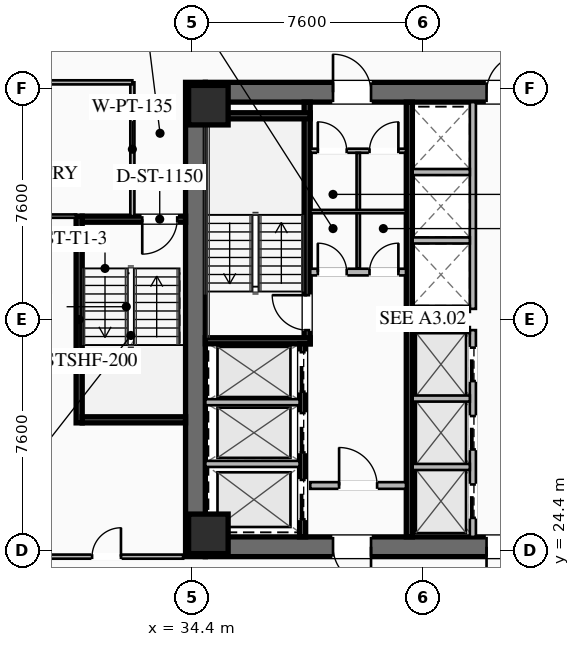
"""IFC4 building model, lengths in metres.
Left out: names, types, materials, properties, quantities, classifications, styles, units other than length and angle.
Written with IfcOpenShell. Run it as: python <this file> out.ifc"""

import sys

from ifc_helpers import new_model, si_unit, direction, frame, frame_2d, origin, origin_2d, place, context, subcontext, project, spatial, rectangle, hollow_rectangle, extrude, element, fill, save


model = new_model("IFC4")
c1 = context("Model", 3, precision=1e-05, world=origin(), true_north=direction((0.0, 1.0)))
c2 = subcontext(c1, "Body", "Model", "MODEL_VIEW")
j1 = project(units=[si_unit("LENGTHUNIT", "METRE"), si_unit("PLANEANGLEUNIT", "RADIAN")], contexts=[c1])
p1 = place(None, origin())
s1 = spatial("IfcSite", under=j1, at=p1, CompositionType="ELEMENT")
p2 = place(p1, origin())
s2 = spatial("IfcBuilding", under=s1, at=p2, CompositionType="ELEMENT")
p3 = place(p2, frame((0.0, 0.0, 88.5)))
s3 = spatial("IfcBuildingStorey", under=s2, at=p3, CompositionType="ELEMENT", Elevation=88.5)
p4 = place(p3, frame((34.525, 24.2, 0.0), z_axis=(0.0, 0.0, 1.0), x_axis=(0.0, 1.0, 0.0)))
e1 = element("IfcWall", 1, at=p4, inside=s3, PredefinedType="SHEAR", context=c2, shape_type="SweptSolid", body=[
    extrude(rectangle(XDim=15.6, YDim=0.65, at=frame_2d((7.8, 0.0))), origin(), (0.0, 0.0, 1.0), 3.55),
])
p5 = place(p3, frame((49.15, 24.525, 0.0), z_axis=(0.0, 0.0, 1.0), x_axis=(-1.0, 0.0, 0.0)))
e2 = element("IfcWall", 2, at=p5, inside=s3, PredefinedType="SHEAR", context=c2, shape_type="SweptSolid", body=[
    extrude(rectangle(XDim=14.3, YDim=0.65, at=frame_2d((7.15, 0.0))), origin(), (0.0, 0.0, 1.0), 3.55),
])
p6 = place(p5, frame((8.85, 0.0, 0.0)))
e3 = element("IfcOpeningElement", 3, at=p6, cuts=e2, PredefinedType="OPENING", context=c2, shape_type="SweptSolid", body=[
    extrude(rectangle(XDim=1.25, YDim=2.25, at=frame_2d((0.625, 1.125))), frame((0.0, 0.335, 0.0), z_axis=(0.0, -1.0, 0.0), x_axis=(1.0, 0.0, 0.0)), (0.0, 0.0, 1.0), 0.67),
])
p7 = place(p5, frame((3.8, 0.0, 0.0)))
e4 = element("IfcOpeningElement", 4, at=p7, cuts=e2, PredefinedType="OPENING", context=c2, shape_type="SweptSolid", body=[
    extrude(rectangle(XDim=1.25, YDim=2.25, at=frame_2d((0.625, 1.125))), frame((0.0, 0.335, 0.0), z_axis=(0.0, -1.0, 0.0), x_axis=(1.0, 0.0, 0.0)), (0.0, 0.0, 1.0), 0.67),
])
p8 = place(p3, frame((34.85, 39.475, 0.0), z_axis=(0.0, 0.0, 1.0), x_axis=(1.0, 0.0, 0.0)))
e5 = element("IfcWall", 5, at=p8, inside=s3, PredefinedType="SHEAR", context=c2, shape_type="SweptSolid", body=[
    extrude(rectangle(XDim=14.3, YDim=0.65, at=frame_2d((7.15, 0.0))), origin(), (0.0, 0.0, 1.0), 3.55),
])
p9 = place(p8, frame((4.2, 0.0, 0.0)))
e6 = element("IfcOpeningElement", 6, at=p9, cuts=e5, PredefinedType="OPENING", context=c2, shape_type="SweptSolid", body=[
    extrude(rectangle(XDim=1.25, YDim=2.25, at=frame_2d((0.625, 1.125))), frame((0.0, 0.335, 0.0), z_axis=(0.0, -1.0, 0.0), x_axis=(1.0, 0.0, 0.0)), (0.0, 0.0, 1.0), 0.67),
])
p10 = place(p8, frame((9.25, 0.0, 0.0)))
e7 = element("IfcOpeningElement", 7, at=p10, cuts=e5, PredefinedType="OPENING", context=c2, shape_type="SweptSolid", body=[
    extrude(rectangle(XDim=1.25, YDim=2.25, at=frame_2d((0.625, 1.125))), frame((0.0, 0.335, 0.0), z_axis=(0.0, -1.0, 0.0), x_axis=(1.0, 0.0, 0.0)), (0.0, 0.0, 1.0), 0.67),
])
for number, where, z_axis, x_axis in (
    (8, (34.95, 24.95, 0.0), (0.0, 0.0, 1.0), (1.0, 0.0, 0.0)),
    (9, (34.95, 39.05, 0.0), (0.0, 0.0, 1.0), (1.0, 0.0, 0.0)),
):
    element("IfcColumn", number, at=place(p3, frame(where, z_axis=z_axis, x_axis=x_axis)), inside=s3, PredefinedType="COLUMN", context=c2, shape_type="SweptSolid", body=[
        extrude(hollow_rectangle(XDim=1.3, YDim=1.3, WallThickness=0.05, at=origin_2d()), origin(), (0.0, 0.0, 1.0), 3.35),
    ])
p11 = place(p3, frame((38.2, 31.2, 0.0), z_axis=(0.0, 0.0, 1.0), x_axis=(0.0, 1.0, 0.0)))
e10 = element("IfcWall", 10, at=p11, inside=s3, PredefinedType="SHEAR", context=c2, shape_type="SweptSolid", body=[
    extrude(rectangle(XDim=7.95, YDim=0.2, at=frame_2d((3.975, 0.0))), origin(), (0.0, 0.0, 1.0), 3.35),
])
p12 = place(p11, frame((0.45, 0.0, 0.0)))
e11 = element("IfcOpeningElement", 11, at=p12, cuts=e10, PredefinedType="OPENING", context=c2, shape_type="SweptSolid", body=[
    extrude(rectangle(XDim=1.15, YDim=2.2, at=frame_2d((0.575, 1.1))), frame((0.0, 0.11, 0.0), z_axis=(0.0, -1.0, 0.0), x_axis=(1.0, 0.0, 0.0)), (0.0, 0.0, 1.0), 0.22),
])
for number, where, z_axis, x_axis in (
    (12, (34.85, 31.3, 0.0), (0.0, 0.0, 1.0), (1.0, 0.0, 0.0)),
    (13, (34.85, 38.7, 0.0), (0.0, 0.0, 1.0), (1.0, 0.0, 0.0)),
):
    element("IfcWall", number, at=place(p3, frame(where, z_axis=z_axis, x_axis=x_axis)), inside=s3, PredefinedType="SHEAR", context=c2, shape_type="SweptSolid", body=[
        extrude(rectangle(XDim=3.45, YDim=0.2, at=frame_2d((1.725, 0.0))), origin(), (0.0, 0.0, 1.0), 3.35),
    ])
p13 = place(p3, frame((41.56, 24.85, 0.0), z_axis=(0.0, 0.0, 1.0), x_axis=(0.0, 1.0, 0.0)))
e14 = element("IfcWall", 14, at=p13, inside=s3, PredefinedType="SHEAR", context=c2, shape_type="SweptSolid", body=[
    extrude(rectangle(XDim=14.3, YDim=0.2, at=frame_2d((7.15, 0.0))), origin(), (0.0, 0.0, 1.0), 3.35),
])
p14 = place(p3, frame((38.3, 33.56, 0.0), z_axis=(0.0, 0.0, 1.0), x_axis=(1.0, 0.0, 0.0)))
e15 = element("IfcWall", 15, at=p14, inside=s3, PredefinedType="SOLIDWALL", context=c2, shape_type="SweptSolid", body=[
    extrude(rectangle(XDim=3.15, YDim=0.22, at=frame_2d((1.575, 0.0))), origin(), (0.0, 0.0, 1.0), 2.703),
])
p15 = place(p14, frame((0.25, 0.0, 0.0)))
e16 = element("IfcOpeningElement", 16, at=p15, cuts=e15, PredefinedType="OPENING", context=c2, shape_type="SweptSolid", body=[
    extrude(rectangle(XDim=0.95, YDim=2.05, at=frame_2d((0.475, 1.025))), frame((0.0, 0.12, 0.0), z_axis=(0.0, -1.0, 0.0), x_axis=(1.0, 0.0, 0.0)), (0.0, 0.0, 1.0), 0.24),
])
p16 = place(p14, frame((1.95, 0.0, 0.0)))
e17 = element("IfcOpeningElement", 17, at=p16, cuts=e15, PredefinedType="OPENING", context=c2, shape_type="SweptSolid", body=[
    extrude(rectangle(XDim=0.95, YDim=2.05, at=frame_2d((0.475, 1.025))), frame((0.0, 0.12, 0.0), z_axis=(0.0, -1.0, 0.0), x_axis=(1.0, 0.0, 0.0)), (0.0, 0.0, 1.0), 0.24),
])
p17 = place(p3, frame((38.3, 26.54, 0.0), z_axis=(0.0, 0.0, 1.0), x_axis=(1.0, 0.0, 0.0)))
e18 = element("IfcWall", 18, at=p17, inside=s3, PredefinedType="SOLIDWALL", context=c2, shape_type="SweptSolid", body=[
    extrude(rectangle(XDim=3.15, YDim=0.22, at=frame_2d((1.575, 0.0))), origin(), (0.0, 0.0, 1.0), 2.703),
])
p18 = place(p17, frame((0.95, 0.0, 0.0)))
e19 = element("IfcOpeningElement", 19, at=p18, cuts=e18, PredefinedType="OPENING", context=c2, shape_type="SweptSolid", body=[
    extrude(rectangle(XDim=1.25, YDim=2.25, at=frame_2d((0.625, 1.125))), frame((0.0, 0.12, 0.0), z_axis=(0.0, -1.0, 0.0), x_axis=(1.0, 0.0, 0.0)), (0.0, 0.0, 1.0), 0.24),
])
p19 = place(p3, frame((38.05, 24.85, 0.0), z_axis=(0.0, 0.0, 1.0), x_axis=(0.0, 1.0, 0.0)))
e20 = element("IfcWall", 20, at=p19, inside=s3, PredefinedType="SHEAR", context=c2, shape_type="SweptSolid", body=[
    extrude(rectangle(XDim=6.35, YDim=0.2, at=frame_2d((3.175, 0.0))), origin(), (0.0, 0.0, 1.0), 3.35),
])
p20 = place(p19, frame((4.775, 0.0, 0.0)))
e21 = element("IfcOpeningElement", 21, at=p20, cuts=e20, PredefinedType="OPENING", context=c2, shape_type="SweptSolid", body=[
    extrude(rectangle(XDim=1.3, YDim=2.25, at=frame_2d((0.65, 1.125))), frame((0.0, 0.11, 0.0), z_axis=(0.0, -1.0, 0.0), x_axis=(1.0, 0.0, 0.0)), (0.0, 0.0, 1.0), 0.22),
])
p21 = place(p19, frame((2.775, 0.0, 0.0)))
e22 = element("IfcOpeningElement", 22, at=p21, cuts=e20, PredefinedType="OPENING", context=c2, shape_type="SweptSolid", body=[
    extrude(rectangle(XDim=1.3, YDim=2.25, at=frame_2d((0.65, 1.125))), frame((0.0, 0.11, 0.0), z_axis=(0.0, -1.0, 0.0), x_axis=(1.0, 0.0, 0.0)), (0.0, 0.0, 1.0), 0.22),
])
p22 = place(p19, frame((0.575, 0.0, 0.0)))
e23 = element("IfcOpeningElement", 23, at=p22, cuts=e20, PredefinedType="OPENING", context=c2, shape_type="SweptSolid", body=[
    extrude(rectangle(XDim=1.3, YDim=2.25, at=frame_2d((0.65, 1.125))), frame((0.0, 0.11, 0.0), z_axis=(0.0, -1.0, 0.0), x_axis=(1.0, 0.0, 0.0)), (0.0, 0.0, 1.0), 0.22),
])
for number, where, z_axis, x_axis in (
    (24, (34.85, 27.25, 0.0), (0.0, 0.0, 1.0), (1.0, 0.0, 0.0)),
    (25, (34.85, 29.28, 0.0), (0.0, 0.0, 1.0), (1.0, 0.0, 0.0)),
):
    element("IfcWall", number, at=place(p3, frame(where, z_axis=z_axis, x_axis=x_axis)), inside=s3, PredefinedType="SOLIDWALL", context=c2, shape_type="SweptSolid", body=[
        extrude(rectangle(XDim=3.1, YDim=0.2, at=frame_2d((1.55, 0.0))), origin(), (0.0, 0.0, 1.0), 3.35),
    ])
p23 = place(p3, frame((38.3, 37.55, 0.0), z_axis=(0.0, 0.0, 1.0), x_axis=(1.0, 0.0, 0.0)))
e26 = element("IfcWall", 26, at=p23, inside=s3, PredefinedType="PARTITIONING", context=c2, shape_type="SweptSolid", body=[
    extrude(rectangle(XDim=3.15, YDim=0.135, at=frame_2d((1.575, 0.0))), origin(), (0.0, 0.0, 1.0), 2.703),
])
p24 = place(p23, frame((0.25, 0.0, 0.0)))
e27 = element("IfcOpeningElement", 27, at=p24, cuts=e26, PredefinedType="OPENING", context=c2, shape_type="SweptSolid", body=[
    extrude(rectangle(XDim=0.95, YDim=2.05, at=frame_2d((0.475, 1.025))), frame((0.0, 0.077, 0.0), z_axis=(0.0, -1.0, 0.0), x_axis=(1.0, 0.0, 0.0)), (0.0, 0.0, 1.0), 0.155),
])
p25 = place(p23, frame((1.95, 0.0, 0.0)))
e28 = element("IfcOpeningElement", 28, at=p25, cuts=e26, PredefinedType="OPENING", context=c2, shape_type="SweptSolid", body=[
    extrude(rectangle(XDim=0.95, YDim=2.05, at=frame_2d((0.475, 1.025))), frame((0.0, 0.077, 0.0), z_axis=(0.0, -1.0, 0.0), x_axis=(1.0, 0.0, 0.0)), (0.0, 0.0, 1.0), 0.155),
])
p26 = place(p3, frame((39.88, 33.68, 0.0), z_axis=(0.0, 0.0, 1.0), x_axis=(0.0, 1.0, 0.0)))
e29 = element("IfcWall", 29, at=p26, inside=s3, PredefinedType="PARTITIONING", context=c2, shape_type="SweptSolid", body=[
    extrude(rectangle(XDim=3.8, YDim=0.11, at=frame_2d((1.9, 0.0))), origin(), (0.0, 0.0, 1.0), 2.703),
])
p27 = place(p3, frame((38.3, 35.55, 0.0), z_axis=(0.0, 0.0, 1.0), x_axis=(1.0, 0.0, 0.0)))
e30 = element("IfcWall", 30, at=p27, inside=s3, PredefinedType="PARTITIONING", context=c2, shape_type="SweptSolid", body=[
    extrude(rectangle(XDim=3.15, YDim=0.11, at=frame_2d((1.575, 0.0))), origin(), (0.0, 0.0, 1.0), 2.703),
])
p28 = place(p3, frame((43.65, 24.85, 0.0), z_axis=(0.0, 0.0, 1.0), x_axis=(0.0, 1.0, 0.0)))
e31 = element("IfcWall", 31, at=p28, inside=s3, PredefinedType="SOLIDWALL", context=c2, shape_type="SweptSolid", body=[
    extrude(rectangle(XDim=6.8, YDim=0.2, at=frame_2d((3.4, 0.0))), origin(), (0.0, 0.0, 1.0), 3.35),
])
p29 = place(p28, frame((0.625, 0.0, 0.0)))
e32 = element("IfcOpeningElement", 32, at=p29, cuts=e31, PredefinedType="OPENING", context=c2, shape_type="SweptSolid", body=[
    extrude(rectangle(XDim=1.1, YDim=2.2, at=frame_2d((0.55, 1.1))), frame((0.0, 0.11, 0.0), z_axis=(0.0, -1.0, 0.0), x_axis=(1.0, 0.0, 0.0)), (0.0, 0.0, 1.0), 0.22),
])
p30 = place(p28, frame((2.875, 0.0, 0.0)))
e33 = element("IfcOpeningElement", 33, at=p30, cuts=e31, PredefinedType="OPENING", context=c2, shape_type="SweptSolid", body=[
    extrude(rectangle(XDim=1.1, YDim=2.2, at=frame_2d((0.55, 1.1))), frame((0.0, 0.11, 0.0), z_axis=(0.0, -1.0, 0.0), x_axis=(1.0, 0.0, 0.0)), (0.0, 0.0, 1.0), 0.22),
])
p31 = place(p28, frame((5.125, 0.0, 0.0)))
e34 = element("IfcOpeningElement", 34, at=p31, cuts=e31, PredefinedType="OPENING", context=c2, shape_type="SweptSolid", body=[
    extrude(rectangle(XDim=1.1, YDim=2.2, at=frame_2d((0.55, 1.1))), frame((0.0, 0.11, 0.0), z_axis=(0.0, -1.0, 0.0), x_axis=(1.0, 0.0, 0.0)), (0.0, 0.0, 1.0), 0.22),
])
for number, where, z_axis, x_axis in (
    (35, (41.67, 27.15, 0.0), (0.0, 0.0, 1.0), (1.0, 0.0, 0.0)),
    (36, (41.67, 29.4, 0.0), (0.0, 0.0, 1.0), (1.0, 0.0, 0.0)),
    (37, (41.67, 31.65, 0.0), (0.0, 0.0, 1.0), (1.0, 0.0, 0.0)),
):
    element("IfcWall", number, at=place(p3, frame(where, z_axis=z_axis, x_axis=x_axis)), inside=s3, PredefinedType="SOLIDWALL", context=c2, shape_type="SweptSolid", body=[
        extrude(rectangle(XDim=1.88, YDim=0.2, at=frame_2d((0.94, 0.0))), origin(), (0.0, 0.0, 1.0), 3.35),
    ])
p32 = place(p3, frame((43.65, 32.35, 0.0), z_axis=(0.0, 0.0, 1.0), x_axis=(0.0, 1.0, 0.0)))
e38 = element("IfcWall", 38, at=p32, inside=s3, PredefinedType="SOLIDWALL", context=c2, shape_type="SweptSolid", body=[
    extrude(rectangle(XDim=6.8, YDim=0.2, at=frame_2d((3.4, 0.0))), origin(), (0.0, 0.0, 1.0), 3.35),
])
for number, where, z_axis, x_axis in (
    (39, (41.67, 32.35, 0.0), (0.0, 0.0, 1.0), (1.0, 0.0, 0.0)),
    (40, (41.67, 34.6, 0.0), (0.0, 0.0, 1.0), (1.0, 0.0, 0.0)),
    (41, (41.67, 36.85, 0.0), (0.0, 0.0, 1.0), (1.0, 0.0, 0.0)),
):
    element("IfcWall", number, at=place(p3, frame(where, z_axis=z_axis, x_axis=x_axis)), inside=s3, PredefinedType="SOLIDWALL", context=c2, shape_type="SweptSolid", body=[
        extrude(rectangle(XDim=1.88, YDim=0.2, at=frame_2d((0.94, 0.0))), origin(), (0.0, 0.0, 1.0), 3.35),
    ])
p33 = place(p3, frame((30.7, 28.6, 0.0), z_axis=(0.0, 0.0, 1.0), x_axis=(0.0, 1.0, 0.0)))
e42 = element("IfcWall", 42, at=p33, inside=s3, PredefinedType="SHEAR", context=c2, shape_type="SweptSolid", body=[
    extrude(rectangle(XDim=6.8, YDim=0.2, at=frame_2d((3.4, 0.0))), origin(), (0.0, 0.0, 1.0), 3.35),
])
p34 = place(p3, frame((34.2, 35.3, 0.0), z_axis=(0.0, 0.0, 1.0), x_axis=(-1.0, 0.0, 0.0)))
e43 = element("IfcWall", 43, at=p34, inside=s3, PredefinedType="SHEAR", context=c2, shape_type="SweptSolid", body=[
    extrude(rectangle(XDim=3.4, YDim=0.2, at=frame_2d((1.7, 0.0))), origin(), (0.0, 0.0, 1.0), 3.35),
])
p35 = place(p34, frame((0.275, 0.0, 0.0)))
e44 = element("IfcOpeningElement", 44, at=p35, cuts=e43, PredefinedType="OPENING", context=c2, shape_type="SweptSolid", body=[
    extrude(rectangle(XDim=1.15, YDim=2.2, at=frame_2d((0.575, 1.1))), frame((0.0, 0.11, 0.0), z_axis=(0.0, -1.0, 0.0), x_axis=(1.0, 0.0, 0.0)), (0.0, 0.0, 1.0), 0.22),
])
p36 = place(p3, frame((30.8, 28.7, 0.0), z_axis=(0.0, 0.0, 1.0), x_axis=(1.0, 0.0, 0.0)))
e45 = element("IfcWall", 45, at=p36, inside=s3, PredefinedType="SHEAR", context=c2, shape_type="SweptSolid", body=[
    extrude(rectangle(XDim=3.4, YDim=0.2, at=frame_2d((1.7, 0.0))), origin(), (0.0, 0.0, 1.0), 3.35),
])
p37 = place(p3, frame((32.45, 35.4, 0.0), z_axis=(0.0, 0.0, 1.0), x_axis=(0.0, 1.0, 0.0)))
e46 = element("IfcWall", 46, at=p37, inside=s3, PredefinedType="PARTITIONING", context=c2, shape_type="SweptSolid", body=[
    extrude(rectangle(XDim=4.4, YDim=0.135, at=frame_2d((2.2, 0.0))), origin(), (0.0, 0.0, 1.0), 2.703),
])
p38 = place(p3, frame((32.45, 39.8, 0.0), z_axis=(0.0, 0.0, 1.0), x_axis=(-1.0, 0.0, 0.0)))
e47 = element("IfcWall", 47, at=p38, inside=s3, PredefinedType="PARTITIONING", context=c2, shape_type="SweptSolid", body=[
    extrude(rectangle(XDim=11.43, YDim=0.135, at=frame_2d((5.715, 0.0))), origin(), (0.0, 0.0, 1.0), 2.703),
])
p39 = place(p38, frame((4.89, 0.0, 0.0)))
e48 = element("IfcOpeningElement", 48, at=p39, cuts=e47, PredefinedType="OPENING", context=c2, shape_type="SweptSolid", body=[
    extrude(rectangle(XDim=0.95, YDim=2.05, at=frame_2d((0.475, 1.025))), frame((0.0, 0.077, 0.0), z_axis=(0.0, -1.0, 0.0), x_axis=(1.0, 0.0, 0.0)), (0.0, 0.0, 1.0), 0.155),
])
p40 = place(p3, frame((21.02, 24.2, 0.0), z_axis=(0.0, 0.0, 1.0), x_axis=(1.0, 0.0, 0.0)))
e49 = element("IfcWall", 49, at=p40, inside=s3, PredefinedType="PARTITIONING", context=c2, shape_type="SweptSolid", body=[
    extrude(rectangle(XDim=13.1, YDim=0.135, at=frame_2d((6.55, 0.0))), origin(), (0.0, 0.0, 1.0), 2.703),
])
p41 = place(p40, frame((10.105, 0.0, 0.0)))
e50 = element("IfcOpeningElement", 50, at=p41, cuts=e49, PredefinedType="OPENING", context=c2, shape_type="SweptSolid", body=[
    extrude(rectangle(XDim=0.95, YDim=2.05, at=frame_2d((0.475, 1.025))), frame((0.0, 0.077, 0.0), z_axis=(0.0, -1.0, 0.0), x_axis=(1.0, 0.0, 0.0)), (0.0, 0.0, 1.0), 0.155),
])
p42 = place(p3, frame((30.6, 35.4, 0.0), z_axis=(0.0, 0.0, 1.0), x_axis=(-1.0, 0.0, 0.0)))
e51 = element("IfcWall", 51, at=p42, inside=s3, PredefinedType="PARTITIONING", context=c2, shape_type="SweptSolid", body=[
    extrude(rectangle(XDim=9.58, YDim=0.11, at=frame_2d((4.79, 0.0))), origin(), (0.0, 0.0, 1.0), 2.703),
])
p43 = place(p9, origin())
e52 = element("IfcDoor", 52, at=p43, inside=s3, OperationType="SINGLE_SWING_LEFT", PredefinedType="DOOR", context=c2, shape_type="SweptSolid", body=[
    extrude(rectangle(XDim=1.25, YDim=2.25, at=frame_2d((0.625, 1.125))), frame((0.0, 0.025, 0.0), z_axis=(0.0, -1.0, 0.0), x_axis=(1.0, 0.0, 0.0)), (0.0, 0.0, 1.0), 0.05),
])
fill(e6, e52)
p44 = place(p10, origin())
e53 = element("IfcDoor", 53, at=p44, inside=s3, OperationType="SINGLE_SWING_RIGHT", PredefinedType="DOOR", context=c2, shape_type="SweptSolid", body=[
    extrude(rectangle(XDim=1.25, YDim=2.25, at=frame_2d((0.625, 1.125))), frame((0.0, 0.025, 0.0), z_axis=(0.0, -1.0, 0.0), x_axis=(1.0, 0.0, 0.0)), (0.0, 0.0, 1.0), 0.05),
])
fill(e7, e53)
p45 = place(p6, origin())
e54 = element("IfcDoor", 54, at=p45, inside=s3, OperationType="SINGLE_SWING_LEFT", PredefinedType="DOOR", context=c2, shape_type="SweptSolid", body=[
    extrude(rectangle(XDim=1.25, YDim=2.25, at=frame_2d((0.625, 1.125))), frame((0.0, 0.025, 0.0), z_axis=(0.0, -1.0, 0.0), x_axis=(1.0, 0.0, 0.0)), (0.0, 0.0, 1.0), 0.05),
])
fill(e3, e54)
p46 = place(p7, origin())
e55 = element("IfcDoor", 55, at=p46, inside=s3, OperationType="SINGLE_SWING_RIGHT", PredefinedType="DOOR", context=c2, shape_type="SweptSolid", body=[
    extrude(rectangle(XDim=1.25, YDim=2.25, at=frame_2d((0.625, 1.125))), frame((0.0, 0.025, 0.0), z_axis=(0.0, -1.0, 0.0), x_axis=(1.0, 0.0, 0.0)), (0.0, 0.0, 1.0), 0.05),
])
fill(e4, e55)
p47 = place(p12, origin())
e56 = element("IfcDoor", 56, at=p47, inside=s3, OperationType="SINGLE_SWING_RIGHT", PredefinedType="DOOR", context=c2, shape_type="SweptSolid", body=[
    extrude(rectangle(XDim=1.15, YDim=2.2, at=frame_2d((0.575, 1.1))), frame((0.0, 0.025, 0.0), z_axis=(0.0, -1.0, 0.0), x_axis=(1.0, 0.0, 0.0)), (0.0, 0.0, 1.0), 0.05),
])
fill(e11, e56)
p48 = place(p18, origin())
e57 = element("IfcDoor", 57, at=p48, inside=s3, OperationType="SINGLE_SWING_LEFT", PredefinedType="DOOR", context=c2, shape_type="SweptSolid", body=[
    extrude(rectangle(XDim=1.25, YDim=2.25, at=frame_2d((0.625, 1.125))), frame((0.0, 0.025, 0.0), z_axis=(0.0, -1.0, 0.0), x_axis=(1.0, 0.0, 0.0)), (0.0, 0.0, 1.0), 0.05),
])
fill(e19, e57)
p49 = place(p24, origin())
e58 = element("IfcDoor", 58, at=p49, inside=s3, OperationType="SINGLE_SWING_LEFT", PredefinedType="DOOR", context=c2, shape_type="SweptSolid", body=[
    extrude(rectangle(XDim=0.95, YDim=2.05, at=frame_2d((0.475, 1.025))), frame((0.0, 0.025, 0.0), z_axis=(0.0, -1.0, 0.0), x_axis=(1.0, 0.0, 0.0)), (0.0, 0.0, 1.0), 0.05),
])
fill(e27, e58)
p50 = place(p25, origin())
e59 = element("IfcDoor", 59, at=p50, inside=s3, OperationType="SINGLE_SWING_RIGHT", PredefinedType="DOOR", context=c2, shape_type="SweptSolid", body=[
    extrude(rectangle(XDim=0.95, YDim=2.05, at=frame_2d((0.475, 1.025))), frame((0.0, 0.025, 0.0), z_axis=(0.0, -1.0, 0.0), x_axis=(1.0, 0.0, 0.0)), (0.0, 0.0, 1.0), 0.05),
])
fill(e28, e59)
p51 = place(p15, origin())
e60 = element("IfcDoor", 60, at=p51, inside=s3, OperationType="SINGLE_SWING_LEFT", PredefinedType="DOOR", context=c2, shape_type="SweptSolid", body=[
    extrude(rectangle(XDim=0.95, YDim=2.05, at=frame_2d((0.475, 1.025))), frame((0.0, 0.025, 0.0), z_axis=(0.0, -1.0, 0.0), x_axis=(1.0, 0.0, 0.0)), (0.0, 0.0, 1.0), 0.05),
])
fill(e16, e60)
p52 = place(p16, origin())
e61 = element("IfcDoor", 61, at=p52, inside=s3, OperationType="SINGLE_SWING_RIGHT", PredefinedType="DOOR", context=c2, shape_type="SweptSolid", body=[
    extrude(rectangle(XDim=0.95, YDim=2.05, at=frame_2d((0.475, 1.025))), frame((0.0, 0.025, 0.0), z_axis=(0.0, -1.0, 0.0), x_axis=(1.0, 0.0, 0.0)), (0.0, 0.0, 1.0), 0.05),
])
fill(e17, e61)
p53 = place(p35, origin())
e62 = element("IfcDoor", 62, at=p53, inside=s3, OperationType="SINGLE_SWING_RIGHT", PredefinedType="DOOR", context=c2, shape_type="SweptSolid", body=[
    extrude(rectangle(XDim=1.15, YDim=2.2, at=frame_2d((0.575, 1.1))), frame((0.0, 0.025, 0.0), z_axis=(0.0, -1.0, 0.0), x_axis=(1.0, 0.0, 0.0)), (0.0, 0.0, 1.0), 0.05),
])
fill(e44, e62)
p54 = place(p41, origin())
e63 = element("IfcDoor", 63, at=p54, inside=s3, OperationType="SINGLE_SWING_RIGHT", PredefinedType="DOOR", context=c2, shape_type="SweptSolid", body=[
    extrude(rectangle(XDim=0.95, YDim=2.05, at=frame_2d((0.475, 1.025))), frame((0.0, 0.025, 0.0), z_axis=(0.0, -1.0, 0.0), x_axis=(1.0, 0.0, 0.0)), (0.0, 0.0, 1.0), 0.05),
])
fill(e50, e63)
p55 = place(p20, origin())
e64 = element("IfcDoor", 64, at=p55, inside=s3, OperationType="SLIDING_TO_LEFT", PredefinedType="DOOR", context=c2, shape_type="SweptSolid", body=[
    extrude(rectangle(XDim=1.3, YDim=2.25, at=frame_2d((0.65, 1.125))), frame((0.0, 0.025, 0.0), z_axis=(0.0, -1.0, 0.0), x_axis=(1.0, 0.0, 0.0)), (0.0, 0.0, 1.0), 0.05),
])
fill(e21, e64)
p56 = place(p21, origin())
e65 = element("IfcDoor", 65, at=p56, inside=s3, OperationType="SLIDING_TO_LEFT", PredefinedType="DOOR", context=c2, shape_type="SweptSolid", body=[
    extrude(rectangle(XDim=1.3, YDim=2.25, at=frame_2d((0.65, 1.125))), frame((0.0, 0.025, 0.0), z_axis=(0.0, -1.0, 0.0), x_axis=(1.0, 0.0, 0.0)), (0.0, 0.0, 1.0), 0.05),
])
fill(e22, e65)
p57 = place(p22, origin())
e66 = element("IfcDoor", 66, at=p57, inside=s3, OperationType="SLIDING_TO_LEFT", PredefinedType="DOOR", context=c2, shape_type="SweptSolid", body=[
    extrude(rectangle(XDim=1.3, YDim=2.25, at=frame_2d((0.65, 1.125))), frame((0.0, 0.025, 0.0), z_axis=(0.0, -1.0, 0.0), x_axis=(1.0, 0.0, 0.0)), (0.0, 0.0, 1.0), 0.05),
])
fill(e23, e66)
p58 = place(p29, origin())
e67 = element("IfcDoor", 67, at=p58, inside=s3, OperationType="SLIDING_TO_LEFT", PredefinedType="DOOR", context=c2, shape_type="SweptSolid", body=[
    extrude(rectangle(XDim=1.1, YDim=2.2, at=frame_2d((0.55, 1.1))), frame((0.0, 0.025, 0.0), z_axis=(0.0, -1.0, 0.0), x_axis=(1.0, 0.0, 0.0)), (0.0, 0.0, 1.0), 0.05),
])
fill(e32, e67)
p59 = place(p30, origin())
e68 = element("IfcDoor", 68, at=p59, inside=s3, OperationType="SLIDING_TO_LEFT", PredefinedType="DOOR", context=c2, shape_type="SweptSolid", body=[
    extrude(rectangle(XDim=1.1, YDim=2.2, at=frame_2d((0.55, 1.1))), frame((0.0, 0.025, 0.0), z_axis=(0.0, -1.0, 0.0), x_axis=(1.0, 0.0, 0.0)), (0.0, 0.0, 1.0), 0.05),
])
fill(e33, e68)
p60 = place(p31, origin())
e69 = element("IfcDoor", 69, at=p60, inside=s3, OperationType="SLIDING_TO_LEFT", PredefinedType="DOOR", context=c2, shape_type="SweptSolid", body=[
    extrude(rectangle(XDim=1.1, YDim=2.2, at=frame_2d((0.55, 1.1))), frame((0.0, 0.025, 0.0), z_axis=(0.0, -1.0, 0.0), x_axis=(1.0, 0.0, 0.0)), (0.0, 0.0, 1.0), 0.05),
])
fill(e34, e69)
save(model, sys.argv[1])
